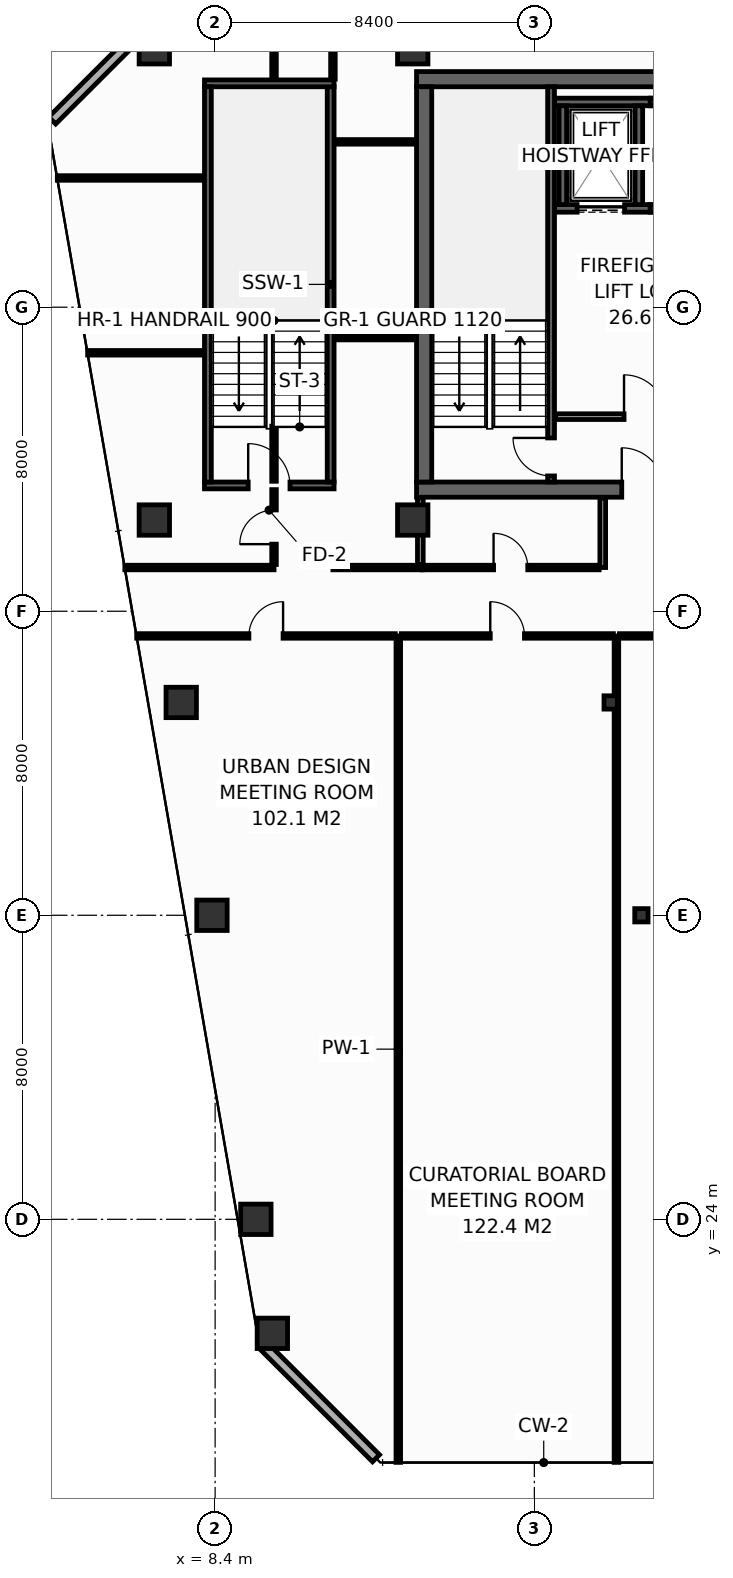
"""IFC4 building model, lengths in metres.
Left out: names, types, materials, properties, quantities, classifications, styles, units other than length and angle.
Written with IfcOpenShell. Run it as: python <this file> out.ifc"""

import sys

from ifc_helpers import new_model, si_unit, direction, frame, frame_2d, origin, origin_2d, place, context, subcontext, project, spatial, rectangle, hollow_rectangle, extrude, element, fill, save


model = new_model("IFC4")
c1 = context("Model", 3, precision=1e-05, world=origin(), true_north=direction((0.0, 1.0)))
c2 = subcontext(c1, "Body", "Model", "MODEL_VIEW")
j1 = project(units=[si_unit("LENGTHUNIT", "METRE"), si_unit("PLANEANGLEUNIT", "RADIAN")], contexts=[c1])
p1 = place(None, origin())
s1 = spatial("IfcSite", under=j1, at=p1, CompositionType="ELEMENT")
p2 = place(p1, origin())
s2 = spatial("IfcBuilding", under=s1, at=p2, CompositionType="ELEMENT")
p3 = place(p2, frame((0.0, 0.0, 245.8)))
s3 = spatial("IfcBuildingStorey", under=s2, at=p3, CompositionType="ELEMENT", Elevation=245.8)
p4 = place(p3, frame((13.7, 43.2, 0.0), z_axis=(0.0, 0.0, 1.0), x_axis=(1.0, 0.0, 0.0)))
e1 = element("IfcWall", 1, at=p4, inside=s3, PredefinedType="SHEAR", context=c2, shape_type="SweptSolid", body=[
    extrude(rectangle(XDim=32.5, YDim=0.4, at=frame_2d((16.25, 0.0))), origin(), (0.0, 0.0, 1.0), 3.55),
])
p5 = place(p4, frame((5.4, 0.0, 0.0)))
e2 = element("IfcOpeningElement", 2, at=p5, cuts=e1, PredefinedType="OPENING", context=c2, shape_type="SweptSolid", body=[
    extrude(rectangle(XDim=1.1, YDim=2.15, at=frame_2d((0.55, 1.075))), frame((0.0, 0.21, 0.0), z_axis=(0.0, -1.0, 0.0), x_axis=(1.0, 0.0, 0.0)), (0.0, 0.0, 1.0), 0.42),
])
p6 = place(p4, frame((25.6, 0.0, 0.0)))
e3 = element("IfcOpeningElement", 3, at=p6, cuts=e1, PredefinedType="OPENING", context=c2, shape_type="SweptSolid", body=[
    extrude(rectangle(XDim=1.1, YDim=2.15, at=frame_2d((0.55, 1.075))), frame((0.0, 0.21, 0.0), z_axis=(0.0, -1.0, 0.0), x_axis=(1.0, 0.0, 0.0)), (0.0, 0.0, 1.0), 0.42),
])
p7 = place(p3, frame((13.7, 54.0, 0.0), z_axis=(0.0, 0.0, 1.0), x_axis=(1.0, 0.0, 0.0)))
e4 = element("IfcWall", 4, at=p7, inside=s3, PredefinedType="SHEAR", context=c2, shape_type="SweptSolid", body=[
    extrude(rectangle(XDim=32.5, YDim=0.4, at=frame_2d((16.25, 0.0))), origin(), (0.0, 0.0, 1.0), 3.55),
])
p8 = place(p3, frame((13.9, 43.4, 0.0), z_axis=(0.0, 0.0, 1.0), x_axis=(0.0, 1.0, 0.0)))
e5 = element("IfcWall", 5, at=p8, inside=s3, PredefinedType="SHEAR", context=c2, shape_type="SweptSolid", body=[
    extrude(rectangle(XDim=10.4, YDim=0.4, at=frame_2d((5.2, 0.0))), origin(), (0.0, 0.0, 1.0), 3.55),
])
for number, where, z_axis, x_axis in (
    (6, (6.8, 54.8, 0.0), (0.0, 0.0, 1.0), (1.0, 0.0, 0.0)),
    (7, (13.6, 54.8, 0.0), (0.0, 0.0, 1.0), (1.0, 0.0, 0.0)),
    (8, (6.8, 42.4, 0.0), (0.0, 0.0, 1.0), (1.0, 0.0, 0.0)),
    (9, (13.6, 42.4, 0.0), (0.0, 0.0, 1.0), (1.0, 0.0, 0.0)),
    (10, (9.906, 21.0, 0.0), (0.0, 0.0, 1.0), (1.0, 0.0, 0.0)),
    (11, (9.472, 24.0, 0.0), (0.0, 0.0, 1.0), (1.0, 0.0, 0.0)),
    (12, (8.317, 32.0, 0.0), (0.0, 0.0, 1.0), (1.0, 0.0, 0.0)),
):
    element("IfcColumn", number, at=place(p3, frame(where, z_axis=z_axis, x_axis=x_axis)), inside=s3, PredefinedType="COLUMN", context=c2, shape_type="SweptSolid", body=[
        extrude(hollow_rectangle(XDim=0.8, YDim=0.8, WallThickness=0.036, at=origin_2d()), origin(), (0.0, 0.0, 1.0), 3.8),
    ])
p9 = place(p3, frame((19.617, 32.0, 0.0), z_axis=(0.0, 0.0, 1.0), x_axis=(1.0, 0.0, 0.0)))
e13 = element("IfcColumn", 13, at=p9, inside=s3, PredefinedType="COLUMN", context=c2, shape_type="SweptSolid", body=[
    extrude(hollow_rectangle(XDim=0.35, YDim=0.35, WallThickness=0.016, at=origin_2d()), origin(), (0.0, 0.0, 1.0), 3.8),
])
p10 = place(p3, frame((7.508, 37.6, 0.0), z_axis=(0.0, 0.0, 1.0), x_axis=(1.0, 0.0, 0.0)))
e14 = element("IfcColumn", 14, at=p10, inside=s3, PredefinedType="COLUMN", context=c2, shape_type="SweptSolid", body=[
    extrude(hollow_rectangle(XDim=0.8, YDim=0.8, WallThickness=0.036, at=origin_2d()), origin(), (0.0, 0.0, 1.0), 3.8),
])
p11 = place(p3, frame((18.808, 37.6, 0.0), z_axis=(0.0, 0.0, 1.0), x_axis=(1.0, 0.0, 0.0)))
e15 = element("IfcColumn", 15, at=p11, inside=s3, PredefinedType="COLUMN", context=c2, shape_type="SweptSolid", body=[
    extrude(hollow_rectangle(XDim=0.35, YDim=0.35, WallThickness=0.016, at=origin_2d()), origin(), (0.0, 0.0, 1.0), 3.8),
])
p12 = place(p3, frame((17.33, 50.6, 0.0), z_axis=(0.0, 0.0, 1.0), x_axis=(1.0, 0.0, 0.0)))
e16 = element("IfcWall", 16, at=p12, inside=s3, PredefinedType="SHEAR", context=c2, shape_type="SweptSolid", body=[
    extrude(rectangle(XDim=2.52, YDim=0.2, at=frame_2d((1.26, 0.0))), origin(), (0.0, 0.0, 1.0), 3.55),
])
p13 = place(p12, frame((0.595, 0.0, 0.0)))
e17 = element("IfcOpeningElement", 17, at=p13, cuts=e16, PredefinedType="OPENING", context=c2, shape_type="SweptSolid", body=[
    extrude(rectangle(XDim=1.25, YDim=2.3, at=frame_2d((0.625, 1.15))), frame((0.0, 0.11, 0.0), z_axis=(0.0, -1.0, 0.0), x_axis=(1.0, 0.0, 0.0)), (0.0, 0.0, 1.0), 0.22),
])
p14 = place(p3, frame((17.33, 53.4, 0.0), z_axis=(0.0, 0.0, 1.0), x_axis=(1.0, 0.0, 0.0)))
e18 = element("IfcWall", 18, at=p14, inside=s3, PredefinedType="SHEAR", context=c2, shape_type="SweptSolid", body=[
    extrude(rectangle(XDim=2.52, YDim=0.2, at=frame_2d((1.26, 0.0))), origin(), (0.0, 0.0, 1.0), 3.55),
])
for number, where, z_axis, x_axis in (
    (19, (17.55, 50.7, 0.0), (0.0, 0.0, 1.0), (0.0, 1.0, 0.0)),
    (20, (19.55, 50.7, 0.0), (0.0, 0.0, 1.0), (0.0, 1.0, 0.0)),
):
    element("IfcWall", number, at=place(p3, frame(where, z_axis=z_axis, x_axis=x_axis)), inside=s3, PredefinedType="SHEAR", context=c2, shape_type="SweptSolid", body=[
        extrude(rectangle(XDim=2.6, YDim=0.2, at=frame_2d((1.3, 0.0))), origin(), (0.0, 0.0, 1.0), 3.55),
    ])
p15 = place(p3, frame((19.85, 50.6, 0.0), z_axis=(0.0, 0.0, 1.0), x_axis=(1.0, 0.0, 0.0)))
e21 = element("IfcWall", 21, at=p15, inside=s3, PredefinedType="SHEAR", context=c2, shape_type="SweptSolid", body=[
    extrude(rectangle(XDim=2.65, YDim=0.2, at=frame_2d((1.325, 0.0))), origin(), (0.0, 0.0, 1.0), 3.55),
])
p16 = place(p15, frame((0.675, 0.0, 0.0)))
e22 = element("IfcOpeningElement", 22, at=p16, cuts=e21, PredefinedType="OPENING", context=c2, shape_type="SweptSolid", body=[
    extrude(rectangle(XDim=1.25, YDim=2.3, at=frame_2d((0.625, 1.15))), frame((0.0, 0.11, 0.0), z_axis=(0.0, -1.0, 0.0), x_axis=(1.0, 0.0, 0.0)), (0.0, 0.0, 1.0), 0.22),
])
p17 = place(p3, frame((19.85, 53.4, 0.0), z_axis=(0.0, 0.0, 1.0), x_axis=(1.0, 0.0, 0.0)))
e23 = element("IfcWall", 23, at=p17, inside=s3, PredefinedType="SHEAR", context=c2, shape_type="SweptSolid", body=[
    extrude(rectangle(XDim=2.65, YDim=0.2, at=frame_2d((1.325, 0.0))), origin(), (0.0, 0.0, 1.0), 3.55),
])
p18 = place(p3, frame((17.24, 43.4, 0.0), z_axis=(0.0, 0.0, 1.0), x_axis=(0.0, 1.0, 0.0)))
e24 = element("IfcWall", 24, at=p18, inside=s3, PredefinedType="SHEAR", context=c2, shape_type="SweptSolid", body=[
    extrude(rectangle(XDim=10.4, YDim=0.18, at=frame_2d((5.2, 0.0))), origin(), (0.0, 0.0, 1.0), 3.55),
])
p19 = place(p18, frame((0.16, 0.0, 0.0)))
e25 = element("IfcOpeningElement", 25, at=p19, cuts=e24, PredefinedType="OPENING", context=c2, shape_type="SweptSolid", body=[
    extrude(rectangle(XDim=1.0, YDim=2.15, at=frame_2d((0.5, 1.075))), frame((0.0, 0.1, 0.0), z_axis=(0.0, -1.0, 0.0), x_axis=(1.0, 0.0, 0.0)), (0.0, 0.0, 1.0), 0.2),
])
p20 = place(p3, frame((8.12, 43.31, 0.0), z_axis=(0.0, 0.0, 1.0), x_axis=(1.0, 0.0, 0.0)))
e26 = element("IfcWall", 26, at=p20, inside=s3, PredefinedType="SHEAR", context=c2, shape_type="SweptSolid", body=[
    extrude(rectangle(XDim=3.41, YDim=0.18, at=frame_2d((1.705, 0.0))), origin(), (0.0, 0.0, 1.0), 3.55),
])
p21 = place(p20, frame((1.15, 0.0, 0.0)))
e27 = element("IfcOpeningElement", 27, at=p21, cuts=e26, PredefinedType="OPENING", context=c2, shape_type="SweptSolid", body=[
    extrude(rectangle(XDim=1.1, YDim=2.15, at=frame_2d((0.55, 1.075))), frame((0.0, 0.1, 0.0), z_axis=(0.0, -1.0, 0.0), x_axis=(1.0, 0.0, 0.0)), (0.0, 0.0, 1.0), 0.2),
])
p22 = place(p3, frame((11.44, 43.4, 0.0), z_axis=(0.0, 0.0, 1.0), x_axis=(0.0, 1.0, 0.0)))
e28 = element("IfcWall", 28, at=p22, inside=s3, PredefinedType="SHEAR", context=c2, shape_type="SweptSolid", body=[
    extrude(rectangle(XDim=10.4, YDim=0.18, at=frame_2d((5.2, 0.0))), origin(), (0.0, 0.0, 1.0), 3.55),
])
p23 = place(p3, frame((11.53, 53.89, 0.0), z_axis=(0.0, 0.0, 1.0), x_axis=(-1.0, 0.0, 0.0)))
e29 = element("IfcWall", 29, at=p23, inside=s3, PredefinedType="SHEAR", context=c2, shape_type="SweptSolid", body=[
    extrude(rectangle(XDim=3.41, YDim=0.18, at=frame_2d((1.705, 0.0))), origin(), (0.0, 0.0, 1.0), 3.55),
])
p24 = place(p3, frame((8.21, 53.8, 0.0), z_axis=(0.0, 0.0, 1.0), x_axis=(0.0, -1.0, 0.0)))
e30 = element("IfcWall", 30, at=p24, inside=s3, PredefinedType="SHEAR", context=c2, shape_type="SweptSolid", body=[
    extrude(rectangle(XDim=10.4, YDim=0.18, at=frame_2d((5.2, 0.0))), origin(), (0.0, 0.0, 1.0), 3.55),
])
p25 = place(p3, frame((17.36, 45.12, 0.0), z_axis=(0.0, 0.0, 1.0), x_axis=(1.0, 0.0, 0.0)))
e31 = element("IfcWall", 31, at=p25, inside=s3, PredefinedType="PARTITIONING", context=c2, shape_type="SweptSolid", body=[
    extrude(rectangle(XDim=5.14, YDim=0.15, at=frame_2d((2.57, 0.0))), origin(), (0.0, 0.0, 1.0), 3.55),
])
p26 = place(p25, frame((1.8, 0.0, 0.0)))
e32 = element("IfcOpeningElement", 32, at=p26, cuts=e31, PredefinedType="OPENING", context=c2, shape_type="SweptSolid", body=[
    extrude(rectangle(XDim=1.1, YDim=2.15, at=frame_2d((0.55, 1.075))), frame((0.0, 0.085, 0.0), z_axis=(0.0, -1.0, 0.0), x_axis=(1.0, 0.0, 0.0)), (0.0, 0.0, 1.0), 0.17),
])
p27 = place(p3, frame((9.66, 20.687, 0.0), z_axis=(0.0, 0.0, 1.0), x_axis=(0.70707775441, -0.707135806771, 0.0)))
e33 = element("IfcWall", 33, at=p27, inside=s3, PredefinedType="STANDARD", context=c2, shape_type="SweptSolid", body=[
    extrude(rectangle(XDim=4.206, YDim=0.26, at=frame_2d((2.103, 0.0))), origin(), (0.0, 0.0, 1.0), 3.55),
])
p28 = place(p3, frame((7.087, 55.887, 0.0), z_axis=(0.0, 0.0, 1.0), x_axis=(-0.707106781187, -0.707106781187, 0.0)))
e34 = element("IfcWall", 34, at=p28, inside=s3, PredefinedType="STANDARD", context=c2, shape_type="SweptSolid", body=[
    extrude(rectangle(XDim=4.206, YDim=0.26, at=frame_2d((2.103, 0.0))), origin(), (0.0, 0.0, 1.0), 3.55),
])
p29 = place(p3, frame((6.024, 41.15, 0.0), z_axis=(0.0, 0.0, 1.0), x_axis=(1.0, 0.0, 0.0)))
e35 = element("IfcWall", 35, at=p29, inside=s3, PredefinedType="PARTITIONING", context=c2, shape_type="SweptSolid", body=[
    extrude(rectangle(XDim=3.926, YDim=0.12, at=frame_2d((1.963, 0.0))), origin(), (0.0, 0.0, 1.0), 3.085),
])
p30 = place(p3, frame((11.5, 41.15, 0.0), z_axis=(0.0, 0.0, 1.0), x_axis=(1.0, 0.0, 0.0)))
e36 = element("IfcWall", 36, at=p30, inside=s3, PredefinedType="PARTITIONING", context=c2, shape_type="SweptSolid", body=[
    extrude(rectangle(XDim=2.35, YDim=0.12, at=frame_2d((1.175, 0.0))), origin(), (0.0, 0.0, 1.0), 3.55),
])
p31 = place(p3, frame((11.55, 52.35, 0.0), z_axis=(0.0, 0.0, 1.0), x_axis=(1.0, 0.0, 0.0)))
e37 = element("IfcWall", 37, at=p31, inside=s3, PredefinedType="PARTITIONING", context=c2, shape_type="SweptSolid", body=[
    extrude(rectangle(XDim=2.13, YDim=0.12, at=frame_2d((1.065, 0.0))), origin(), (0.0, 0.0, 1.0), 3.55),
])
p32 = place(p3, frame((11.5, 54.0, 0.0), z_axis=(0.0, 0.0, 1.0), x_axis=(0.0, 1.0, 0.0)))
e38 = element("IfcWall", 38, at=p32, inside=s3, PredefinedType="PARTITIONING", context=c2, shape_type="SweptSolid", body=[
    extrude(rectangle(XDim=1.995, YDim=0.12, at=frame_2d((0.998, 0.0))), origin(), (0.0, 0.0, 1.0), 2.935),
])
p33 = place(p3, frame((5.045, 46.8, 0.0), z_axis=(0.0, 0.0, 1.0), x_axis=(1.0, 0.0, 0.0)))
e39 = element("IfcWall", 39, at=p33, inside=s3, PredefinedType="PARTITIONING", context=c2, shape_type="SweptSolid", body=[
    extrude(rectangle(XDim=3.055, YDim=0.12, at=frame_2d((1.527, 0.0))), origin(), (0.0, 0.0, 1.0), 2.947),
])
p34 = place(p3, frame((4.248, 51.4, 0.0), z_axis=(0.0, 0.0, 1.0), x_axis=(1.0, 0.0, 0.0)))
e40 = element("IfcWall", 40, at=p34, inside=s3, PredefinedType="PARTITIONING", context=c2, shape_type="SweptSolid", body=[
    extrude(rectangle(XDim=3.852, YDim=0.12, at=frame_2d((1.926, 0.0))), origin(), (0.0, 0.0, 1.0), 2.947),
])
p35 = place(p3, frame((9.95, 41.23, 0.0), z_axis=(0.0, 0.0, 1.0), x_axis=(0.0, 1.0, 0.0)))
e41 = element("IfcWall", 41, at=p35, inside=s3, PredefinedType="PARTITIONING", context=c2, shape_type="SweptSolid", body=[
    extrude(rectangle(XDim=1.97, YDim=0.12, at=frame_2d((0.985, 0.0))), origin(), (0.0, 0.0, 1.0), 2.947),
])
p36 = place(p35, frame((0.535, 0.0, 0.0)))
e42 = element("IfcOpeningElement", 42, at=p36, cuts=e41, PredefinedType="OPENING", context=c2, shape_type="SweptSolid", body=[
    extrude(rectangle(XDim=0.9, YDim=2.1, at=frame_2d((0.45, 1.05))), frame((0.0, 0.07, 0.0), z_axis=(0.0, -1.0, 0.0), x_axis=(1.0, 0.0, 0.0)), (0.0, 0.0, 1.0), 0.14),
])
p37 = place(p3, frame((9.95, 43.42, 0.0), z_axis=(0.0, 0.0, 1.0), x_axis=(0.0, 1.0, 0.0)))
e43 = element("IfcWall", 43, at=p37, inside=s3, PredefinedType="PARTITIONING", context=c2, shape_type="SweptSolid", body=[
    extrude(rectangle(XDim=1.45, YDim=0.12, at=frame_2d((0.725, 0.0))), origin(), (0.0, 0.0, 1.0), 3.55),
])
p38 = place(p3, frame((9.95, 54.0, 0.0), z_axis=(0.0, 0.0, 1.0), x_axis=(0.0, 1.0, 0.0)))
e44 = element("IfcWall", 44, at=p38, inside=s3, PredefinedType="PARTITIONING", context=c2, shape_type="SweptSolid", body=[
    extrude(rectangle(XDim=1.995, YDim=0.12, at=frame_2d((0.998, 0.0))), origin(), (0.0, 0.0, 1.0), 2.935),
])
p39 = place(p3, frame((11.55, 47.2, 0.0), z_axis=(0.0, 0.0, 1.0), x_axis=(1.0, 0.0, 0.0)))
e45 = element("IfcWall", 45, at=p39, inside=s3, PredefinedType="PARTITIONING", context=c2, shape_type="SweptSolid", body=[
    extrude(rectangle(XDim=2.13, YDim=0.12, at=frame_2d((1.065, 0.0))), origin(), (0.0, 0.0, 1.0), 3.55),
])
p40 = place(p3, frame((13.8, 41.23, 0.0), z_axis=(0.0, 0.0, 1.0), x_axis=(0.0, 1.0, 0.0)))
e46 = element("IfcWall", 46, at=p40, inside=s3, PredefinedType="PARTITIONING", context=c2, shape_type="SweptSolid", body=[
    extrude(rectangle(XDim=1.75, YDim=0.15, at=frame_2d((0.875, 0.0))), origin(), (0.0, 0.0, 1.0), 3.55),
])
p41 = place(p3, frame((18.6, 41.15, 0.0), z_axis=(0.0, 0.0, 1.0), x_axis=(0.0, 1.0, 0.0)))
e47 = element("IfcWall", 47, at=p41, inside=s3, PredefinedType="PARTITIONING", context=c2, shape_type="SweptSolid", body=[
    extrude(rectangle(XDim=1.83, YDim=0.15, at=frame_2d((0.915, 0.0))), origin(), (0.0, 0.0, 1.0), 3.55),
])
p42 = place(p3, frame((13.85, 41.15, 0.0), z_axis=(0.0, 0.0, 1.0), x_axis=(1.0, 0.0, 0.0)))
e48 = element("IfcWall", 48, at=p42, inside=s3, PredefinedType="PARTITIONING", context=c2, shape_type="SweptSolid", body=[
    extrude(rectangle(XDim=4.655, YDim=0.12, at=frame_2d((2.327, 0.0))), origin(), (0.0, 0.0, 1.0), 3.55),
])
p43 = place(p42, frame((1.877, 0.0, 0.0)))
e49 = element("IfcOpeningElement", 49, at=p43, cuts=e48, PredefinedType="OPENING", context=c2, shape_type="SweptSolid", body=[
    extrude(rectangle(XDim=0.9, YDim=2.1, at=frame_2d((0.45, 1.05))), frame((0.0, 0.07, 0.0), z_axis=(0.0, -1.0, 0.0), x_axis=(1.0, 0.0, 0.0)), (0.0, 0.0, 1.0), 0.14),
])
for number, where, z_axis, x_axis in (
    (50, (13.22, 17.605, 0.0), (0.0, 0.0, 1.0), (0.0, 1.0, 0.0)),
    (51, (18.96, 17.605, 0.0), (0.0, 0.0, 1.0), (0.0, 1.0, 0.0)),
):
    element("IfcWall", number, at=place(p3, frame(where, z_axis=z_axis, x_axis=x_axis)), inside=s3, PredefinedType="PARTITIONING", context=c2, shape_type="SweptSolid", body=[
        extrude(rectangle(XDim=21.745, YDim=0.12, at=frame_2d((10.873, 0.0))), origin(), (0.0, 0.0, 1.0), 2.947),
    ])
p44 = place(p3, frame((6.336, 39.35, 0.0), z_axis=(0.0, 0.0, 1.0), x_axis=(1.0, 0.0, 0.0)))
e52 = element("IfcWall", 52, at=p44, inside=s3, PredefinedType="PARTITIONING", context=c2, shape_type="SweptSolid", body=[
    extrude(rectangle(XDim=6.803, YDim=0.12, at=frame_2d((3.402, 0.0))), origin(), (0.0, 0.0, 1.0), 3.085),
])
p45 = place(p44, frame((2.952, 0.0, 0.0)))
e53 = element("IfcOpeningElement", 53, at=p45, cuts=e52, PredefinedType="OPENING", context=c2, shape_type="SweptSolid", body=[
    extrude(rectangle(XDim=0.9, YDim=2.1, at=frame_2d((0.45, 1.05))), frame((0.0, 0.07, 0.0), z_axis=(0.0, -1.0, 0.0), x_axis=(1.0, 0.0, 0.0)), (0.0, 0.0, 1.0), 0.14),
])
p46 = place(p3, frame((13.3, 39.35, 0.0), z_axis=(0.0, 0.0, 1.0), x_axis=(1.0, 0.0, 0.0)))
e54 = element("IfcWall", 54, at=p46, inside=s3, PredefinedType="PARTITIONING", context=c2, shape_type="SweptSolid", body=[
    extrude(rectangle(XDim=5.58, YDim=0.12, at=frame_2d((2.79, 0.0))), origin(), (0.0, 0.0, 1.0), 3.55),
])
p47 = place(p46, frame((2.34, 0.0, 0.0)))
e55 = element("IfcOpeningElement", 55, at=p47, cuts=e54, PredefinedType="OPENING", context=c2, shape_type="SweptSolid", body=[
    extrude(rectangle(XDim=0.9, YDim=2.1, at=frame_2d((0.45, 1.05))), frame((0.0, 0.07, 0.0), z_axis=(0.0, -1.0, 0.0), x_axis=(1.0, 0.0, 0.0)), (0.0, 0.0, 1.0), 0.14),
])
p48 = place(p3, frame((19.04, 39.35, 0.0), z_axis=(0.0, 0.0, 1.0), x_axis=(1.0, 0.0, 0.0)))
e56 = element("IfcWall", 56, at=p48, inside=s3, PredefinedType="PARTITIONING", context=c2, shape_type="SweptSolid", body=[
    extrude(rectangle(XDim=4.73, YDim=0.12, at=frame_2d((2.365, 0.0))), origin(), (0.0, 0.0, 1.0), 2.947),
])
p49 = place(p48, frame((1.915, 0.0, 0.0)))
e57 = element("IfcOpeningElement", 57, at=p49, cuts=e56, PredefinedType="OPENING", context=c2, shape_type="SweptSolid", body=[
    extrude(rectangle(XDim=0.9, YDim=2.1, at=frame_2d((0.45, 1.05))), frame((0.0, 0.07, 0.0), z_axis=(0.0, -1.0, 0.0), x_axis=(1.0, 0.0, 0.0)), (0.0, 0.0, 1.0), 0.14),
])
p50 = place(p13, origin())
e58 = element("IfcDoor", 58, at=p50, inside=s3, OperationType="SLIDING_TO_LEFT", PredefinedType="DOOR", context=c2, shape_type="SweptSolid", body=[
    extrude(rectangle(XDim=1.25, YDim=2.3, at=frame_2d((0.625, 1.15))), frame((0.0, 0.025, 0.0), z_axis=(0.0, -1.0, 0.0), x_axis=(1.0, 0.0, 0.0)), (0.0, 0.0, 1.0), 0.05),
])
fill(e17, e58)
p51 = place(p19, origin())
e59 = element("IfcDoor", 59, at=p51, inside=s3, OperationType="SINGLE_SWING_RIGHT", PredefinedType="DOOR", context=c2, shape_type="SweptSolid", body=[
    extrude(rectangle(XDim=1.0, YDim=2.15, at=frame_2d((0.5, 1.075))), frame((0.0, 0.025, 0.0), z_axis=(0.0, -1.0, 0.0), x_axis=(1.0, 0.0, 0.0)), (0.0, 0.0, 1.0), 0.05),
])
fill(e25, e59)
p52 = place(p21, origin())
e60 = element("IfcDoor", 60, at=p52, inside=s3, OperationType="SINGLE_SWING_LEFT", PredefinedType="DOOR", context=c2, shape_type="SweptSolid", body=[
    extrude(rectangle(XDim=1.1, YDim=2.15, at=frame_2d((0.55, 1.075))), frame((0.0, 0.025, 0.0), z_axis=(0.0, -1.0, 0.0), x_axis=(1.0, 0.0, 0.0)), (0.0, 0.0, 1.0), 0.05),
])
fill(e27, e60)
p53 = place(p26, origin())
e61 = element("IfcDoor", 61, at=p53, inside=s3, OperationType="SINGLE_SWING_LEFT", PredefinedType="DOOR", context=c2, shape_type="SweptSolid", body=[
    extrude(rectangle(XDim=1.1, YDim=2.15, at=frame_2d((0.55, 1.075))), frame((0.0, 0.025, 0.0), z_axis=(0.0, -1.0, 0.0), x_axis=(1.0, 0.0, 0.0)), (0.0, 0.0, 1.0), 0.05),
])
fill(e32, e61)
p54 = place(p5, origin())
e62 = element("IfcDoor", 62, at=p54, inside=s3, OperationType="SINGLE_SWING_LEFT", PredefinedType="DOOR", context=c2, shape_type="SweptSolid", body=[
    extrude(rectangle(XDim=1.1, YDim=2.15, at=frame_2d((0.55, 1.075))), frame((0.0, 0.025, 0.0), z_axis=(0.0, -1.0, 0.0), x_axis=(1.0, 0.0, 0.0)), (0.0, 0.0, 1.0), 0.05),
])
fill(e2, e62)
p55 = place(p36, origin())
e63 = element("IfcDoor", 63, at=p55, inside=s3, OperationType="SINGLE_SWING_LEFT", PredefinedType="DOOR", context=c2, shape_type="SweptSolid", body=[
    extrude(rectangle(XDim=0.9, YDim=2.1, at=frame_2d((0.45, 1.05))), frame((0.0, 0.025, 0.0), z_axis=(0.0, -1.0, 0.0), x_axis=(1.0, 0.0, 0.0)), (0.0, 0.0, 1.0), 0.05),
])
fill(e42, e63)
p56 = place(p43, origin())
e64 = element("IfcDoor", 64, at=p56, inside=s3, OperationType="SINGLE_SWING_LEFT", PredefinedType="DOOR", context=c2, shape_type="SweptSolid", body=[
    extrude(rectangle(XDim=0.9, YDim=2.1, at=frame_2d((0.45, 1.05))), frame((0.0, 0.025, 0.0), z_axis=(0.0, -1.0, 0.0), x_axis=(1.0, 0.0, 0.0)), (0.0, 0.0, 1.0), 0.05),
])
fill(e49, e64)
p57 = place(p45, origin())
e65 = element("IfcDoor", 65, at=p57, inside=s3, OperationType="SINGLE_SWING_RIGHT", PredefinedType="DOOR", context=c2, shape_type="SweptSolid", body=[
    extrude(rectangle(XDim=0.9, YDim=2.1, at=frame_2d((0.45, 1.05))), frame((0.0, 0.025, 0.0), z_axis=(0.0, -1.0, 0.0), x_axis=(1.0, 0.0, 0.0)), (0.0, 0.0, 1.0), 0.05),
])
fill(e53, e65)
p58 = place(p47, origin())
e66 = element("IfcDoor", 66, at=p58, inside=s3, OperationType="SINGLE_SWING_LEFT", PredefinedType="DOOR", context=c2, shape_type="SweptSolid", body=[
    extrude(rectangle(XDim=0.9, YDim=2.1, at=frame_2d((0.45, 1.05))), frame((0.0, 0.025, 0.0), z_axis=(0.0, -1.0, 0.0), x_axis=(1.0, 0.0, 0.0)), (0.0, 0.0, 1.0), 0.05),
])
fill(e55, e66)
save(model, sys.argv[1])
